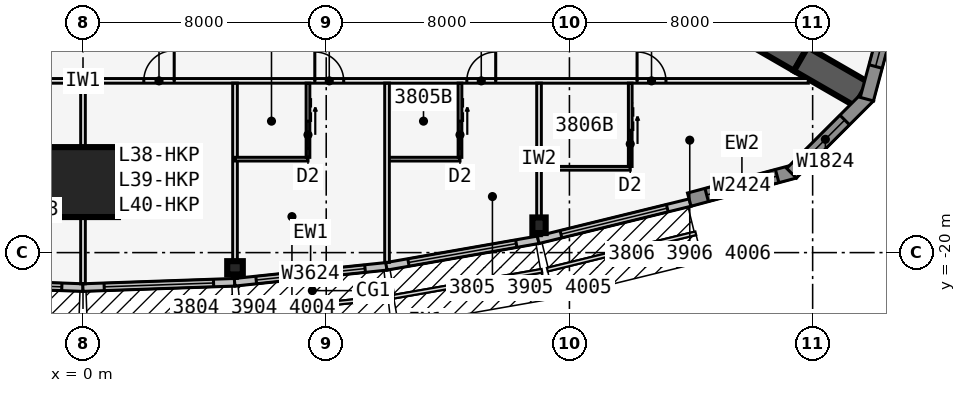
"""IFC4 building model, lengths in metres.
Left out: names, types, materials, properties, quantities, classifications, styles, units other than length and angle.
Written with IfcOpenShell. Run it as: python <this file> out.ifc"""

import sys

from ifc_helpers import new_model, si_unit, direction, frame, frame_2d, origin, origin_2d, place, context, subcontext, project, spatial, polyline, rectangle, i_section, outline, extrude, element, fill, save


model = new_model("IFC4")
c1 = context("Model", 3, precision=1e-05, world=origin(), true_north=direction((0.0, 1.0)))
c2 = subcontext(c1, "Body", "Model", "MODEL_VIEW")
j1 = project(units=[si_unit("LENGTHUNIT", "METRE"), si_unit("PLANEANGLEUNIT", "RADIAN")], contexts=[c1])
p1 = place(None, origin())
s1 = spatial("IfcSite", under=j1, at=p1, CompositionType="ELEMENT")
p2 = place(p1, origin())
s2 = spatial("IfcBuilding", under=s1, at=p2, CompositionType="ELEMENT")
p3 = place(p2, frame((0.0, 0.0, 145.3)))
s3 = spatial("IfcBuildingStorey", under=s2, at=p3, CompositionType="ELEMENT", Elevation=145.3)
for number, where, z_axis, x_axis in (
    (1, (21.61, -12.477, 0.0), (0.0, 0.0, 1.0), (0.866, -0.5, 0.0)),
    (2, (23.61, -13.631, 0.0), (0.0, 0.0, 1.0), (0.866, -0.5, 0.0)),
):
    element("IfcWall", number, at=place(p3, frame(where, z_axis=z_axis, x_axis=x_axis)), inside=s3, PredefinedType="SHEAR", context=c2, shape_type="SweptSolid", body=[
        extrude(rectangle(XDim=2.309, YDim=0.9, at=frame_2d((1.155, 0.0))), origin(), (0.0, 0.0, 1.0), 3.4),
    ])
for number, where, z_axis, x_axis in (
    (3, (5.0, -20.5, 0.0), (0.0, 0.0, 1.0), (0.0, -1.0, 0.0)),
    (4, (15.0, -19.1, 0.0), (0.0, 0.0, 1.0), (1.0, 0.0, 0.0)),
):
    element("IfcColumn", number, at=place(p3, frame(where, z_axis=z_axis, x_axis=x_axis)), inside=s3, PredefinedType="COLUMN", context=c2, shape_type="SweptSolid", body=[
        extrude(i_section(OverallWidth=0.437, OverallDepth=0.513, WebThickness=0.061, FlangeThickness=0.097, at=origin_2d()), origin(), (0.0, 0.0, 1.0), 3.4),
    ])
p4 = place(p3, frame((0.0, -17.68, 0.0), z_axis=(0.0, 0.0, 1.0), x_axis=(0.0, -1.0, 0.0)))
e5 = element("IfcColumn", 5, at=p4, inside=s3, PredefinedType="COLUMN", context=c2, shape_type="SweptSolid", body=[
    extrude(rectangle(XDim=2.3, YDim=2.3, at=origin_2d()), origin(), (0.0, 0.0, 1.0), 3.4),
])
p5 = place(p3, frame((-4.996, -20.975, 0.0), z_axis=(0.0, 0.0, 1.0), x_axis=(0.999387720943, -0.034988329879, 0.0)))
e6 = element("IfcWall", 6, at=p5, inside=s3, PredefinedType="STANDARD", context=c2, shape_type="SweptSolid", body=[
    extrude(rectangle(XDim=5.003, YDim=0.25, at=frame_2d((2.501, 0.0))), origin(), (0.0, 0.0, 1.0), 3.235),
])
p6 = place(p5, frame((0.701, 0.0, 0.45)))
e7 = element("IfcOpeningElement", 7, at=p6, cuts=e6, PredefinedType="OPENING", context=c2, shape_type="SweptSolid", body=[
    extrude(rectangle(XDim=3.6, YDim=2.4, at=frame_2d((1.8, 1.2))), frame((0.0, 0.135, 0.0), z_axis=(0.0, -1.0, 0.0), x_axis=(1.0, 0.0, 0.0)), (0.0, 0.0, 1.0), 0.27),
])
p7 = place(p3, frame((-0.004, -21.15, 0.0), z_axis=(0.0, 0.0, 1.0), x_axis=(0.999387720943, 0.034988329879, 0.0)))
e8 = element("IfcWall", 8, at=p7, inside=s3, PredefinedType="STANDARD", context=c2, shape_type="SweptSolid", body=[
    extrude(rectangle(XDim=5.003, YDim=0.25, at=frame_2d((2.501, 0.0))), origin(), (0.0, 0.0, 1.0), 3.235),
])
p8 = place(p7, frame((0.701, 0.0, 0.45)))
e9 = element("IfcOpeningElement", 9, at=p8, cuts=e8, PredefinedType="OPENING", context=c2, shape_type="SweptSolid", body=[
    extrude(rectangle(XDim=3.6, YDim=2.4, at=frame_2d((1.8, 1.2))), frame((0.0, 0.135, 0.0), z_axis=(0.0, -1.0, 0.0), x_axis=(1.0, 0.0, 0.0)), (0.0, 0.0, 1.0), 0.27),
])
p9 = place(p3, frame((4.987, -20.976, 0.0), z_axis=(0.0, 0.0, 1.0), x_axis=(0.994534683851, 0.104406717299, 0.0)))
e10 = element("IfcWall", 10, at=p9, inside=s3, PredefinedType="STANDARD", context=c2, shape_type="SweptSolid", body=[
    extrude(rectangle(XDim=5.028, YDim=0.25, at=frame_2d((2.514, 0.0))), origin(), (0.0, 0.0, 1.0), 3.235),
])
p10 = place(p9, frame((0.714, 0.0, 0.45)))
e11 = element("IfcOpeningElement", 11, at=p10, cuts=e10, PredefinedType="OPENING", context=c2, shape_type="SweptSolid", body=[
    extrude(rectangle(XDim=3.6, YDim=2.4, at=frame_2d((1.8, 1.2))), frame((0.0, 0.135, 0.0), z_axis=(0.0, -1.0, 0.0), x_axis=(1.0, 0.0, 0.0)), (0.0, 0.0, 1.0), 0.27),
])
p11 = place(p3, frame((9.979, -20.452, 0.0), z_axis=(0.0, 0.0, 1.0), x_axis=(0.985030467156, 0.172380331752, 0.0)))
e12 = element("IfcWall", 12, at=p11, inside=s3, PredefinedType="STANDARD", context=c2, shape_type="SweptSolid", body=[
    extrude(rectangle(XDim=5.076, YDim=0.25, at=frame_2d((2.538, 0.0))), origin(), (0.0, 0.0, 1.0), 3.235),
])
p12 = place(p11, frame((0.738, 0.0, 0.45)))
e13 = element("IfcOpeningElement", 13, at=p12, cuts=e12, PredefinedType="OPENING", context=c2, shape_type="SweptSolid", body=[
    extrude(rectangle(XDim=3.6, YDim=2.4, at=frame_2d((1.8, 1.2))), frame((0.0, 0.135, 0.0), z_axis=(0.0, -1.0, 0.0), x_axis=(1.0, 0.0, 0.0)), (0.0, 0.0, 1.0), 0.27),
])
p13 = place(p3, frame((14.97, -19.579, 0.0), z_axis=(0.0, 0.0, 1.0), x_axis=(0.971270024053, 0.237980126011, 0.0)))
e14 = element("IfcWall", 14, at=p13, inside=s3, PredefinedType="STANDARD", context=c2, shape_type="SweptSolid", body=[
    extrude(rectangle(XDim=5.148, YDim=0.25, at=frame_2d((2.574, 0.0))), origin(), (0.0, 0.0, 1.0), 3.235),
])
p14 = place(p13, frame((0.774, 0.0, 0.45)))
e15 = element("IfcOpeningElement", 15, at=p14, cuts=e14, PredefinedType="OPENING", context=c2, shape_type="SweptSolid", body=[
    extrude(rectangle(XDim=3.6, YDim=2.4, at=frame_2d((1.8, 1.2))), frame((0.0, 0.135, 0.0), z_axis=(0.0, -1.0, 0.0), x_axis=(1.0, 0.0, 0.0)), (0.0, 0.0, 1.0), 0.27),
])
p15 = place(p3, frame((19.942, -18.258, 0.0), z_axis=(0.0, 0.0, 1.0), x_axis=(0.965924653531, 0.258823421857, 0.0)))
e16 = element("IfcWall", 16, at=p15, inside=s3, PredefinedType="SOLIDWALL", context=c2, shape_type="SweptSolid", body=[
    extrude(rectangle(XDim=3.586, YDim=0.45, at=frame_2d((1.793, 0.0))), origin(), (0.0, 0.0, 1.0), 3.235),
])
p16 = place(p15, frame((0.593, 0.0, 0.45)))
e17 = element("IfcOpeningElement", 17, at=p16, cuts=e16, PredefinedType="OPENING", context=c2, shape_type="SweptSolid", body=[
    extrude(rectangle(XDim=2.4, YDim=2.4, at=frame_2d((1.2, 1.2))), frame((0.0, 0.235, 0.0), z_axis=(0.0, -1.0, 0.0), x_axis=(1.0, 0.0, 0.0)), (0.0, 0.0, 1.0), 0.47),
])
p17 = place(p3, frame((23.305, -17.388, 0.0), z_axis=(0.0, 0.0, 1.0), x_axis=(0.707106781187, 0.707106781187, 0.0)))
e18 = element("IfcWall", 18, at=p17, inside=s3, PredefinedType="SOLIDWALL", context=c2, shape_type="SweptSolid", body=[
    extrude(outline(polyline([(3.586, 0.225), (3.527, 0.225), (3.035, 0.093), (3.0, 0.225), (0.0, 0.225), (0.0, -0.225), (3.586, -0.225), (3.586, 0.225)])), origin(), (0.0, 0.0, 1.0), 3.235),
])
p18 = place(p17, frame((0.675, 0.0, 0.45)))
e19 = element("IfcOpeningElement", 19, at=p18, cuts=e18, PredefinedType="OPENING", context=c2, shape_type="SweptSolid", body=[
    extrude(rectangle(XDim=1.8, YDim=2.4, at=frame_2d((0.9, 1.2))), frame((0.0, 0.235, 0.0), z_axis=(0.0, -1.0, 0.0), x_axis=(1.0, 0.0, 0.0)), (0.0, 0.0, 1.0), 0.47),
])
p19 = place(p3, frame((25.783, -14.953, 0.0), z_axis=(0.0, 0.0, 1.0), x_axis=(0.258823421857, 0.965924653531, 0.0)))
e20 = element("IfcWall", 20, at=p19, inside=s3, PredefinedType="SOLIDWALL", context=c2, shape_type="SweptSolid", body=[
    extrude(outline(polyline([(3.586, 0.225), (0.586, 0.225), (0.551, 0.093), (0.06, 0.225), (0.0, 0.225), (0.0, -0.225), (3.586, -0.225), (3.586, 0.225)])), origin(), (0.0, 0.0, 1.0), 3.235),
])
p20 = place(p19, frame((1.111, 0.0, 0.45)))
e21 = element("IfcOpeningElement", 21, at=p20, cuts=e20, PredefinedType="OPENING", context=c2, shape_type="SweptSolid", body=[
    extrude(rectangle(XDim=1.8, YDim=2.4, at=frame_2d((0.9, 1.2))), frame((0.0, 0.235, 0.0), z_axis=(0.0, -1.0, 0.0), x_axis=(1.0, 0.0, 0.0)), (0.0, 0.0, 1.0), 0.47),
])
p21 = place(p3, frame((-23.857, -14.351, 0.0), z_axis=(0.0, 0.0, 1.0), x_axis=(1.0, 0.0, 0.0)))
e22 = element("IfcWall", 22, at=p21, inside=s3, PredefinedType="PARTITIONING", context=c2, shape_type="SweptSolid", body=[
    extrude(rectangle(XDim=47.714, YDim=0.15, at=frame_2d((23.857, 0.0))), origin(), (0.0, 0.0, 1.0), 3.235),
])
p22 = place(p21, frame((3.723, 0.0, 0.0)))
e23 = element("IfcOpeningElement", 23, at=p22, cuts=e22, PredefinedType="OPENING", context=c2, shape_type="SweptSolid", body=[
    extrude(rectangle(XDim=0.95, YDim=2.13, at=frame_2d((0.475, 1.065))), frame((0.0, 0.085, 0.0), z_axis=(0.0, -1.0, 0.0), x_axis=(1.0, 0.0, 0.0)), (0.0, 0.0, 1.0), 0.17),
])
p23 = place(p21, frame((17.082, 0.0, 0.0)))
e24 = element("IfcOpeningElement", 24, at=p23, cuts=e22, PredefinedType="OPENING", context=c2, shape_type="SweptSolid", body=[
    extrude(rectangle(XDim=0.95, YDim=2.13, at=frame_2d((0.475, 1.065))), frame((0.0, 0.085, 0.0), z_axis=(0.0, -1.0, 0.0), x_axis=(1.0, 0.0, 0.0)), (0.0, 0.0, 1.0), 0.17),
])
p24 = place(p21, frame((21.482, 0.0, 0.0)))
e25 = element("IfcOpeningElement", 25, at=p24, cuts=e22, PredefinedType="OPENING", context=c2, shape_type="SweptSolid", body=[
    extrude(rectangle(XDim=0.95, YDim=2.13, at=frame_2d((0.475, 1.065))), frame((0.0, 0.085, 0.0), z_axis=(0.0, -1.0, 0.0), x_axis=(1.0, 0.0, 0.0)), (0.0, 0.0, 1.0), 0.17),
])
p25 = place(p21, frame((25.857, 0.0, 0.0)))
e26 = element("IfcOpeningElement", 26, at=p25, cuts=e22, PredefinedType="OPENING", context=c2, shape_type="SweptSolid", body=[
    extrude(rectangle(XDim=1.0, YDim=2.13, at=frame_2d((0.5, 1.065))), frame((0.0, 0.085, 0.0), z_axis=(0.0, -1.0, 0.0), x_axis=(1.0, 0.0, 0.0)), (0.0, 0.0, 1.0), 0.17),
])
p26 = place(p21, frame((31.482, 0.0, 0.0)))
e27 = element("IfcOpeningElement", 27, at=p26, cuts=e22, PredefinedType="OPENING", context=c2, shape_type="SweptSolid", body=[
    extrude(rectangle(XDim=0.95, YDim=2.13, at=frame_2d((0.475, 1.065))), frame((0.0, 0.085, 0.0), z_axis=(0.0, -1.0, 0.0), x_axis=(1.0, 0.0, 0.0)), (0.0, 0.0, 1.0), 0.17),
])
p27 = place(p21, frame((36.482, 0.0, 0.0)))
e28 = element("IfcOpeningElement", 28, at=p27, cuts=e22, PredefinedType="OPENING", context=c2, shape_type="SweptSolid", body=[
    extrude(rectangle(XDim=0.95, YDim=2.13, at=frame_2d((0.475, 1.065))), frame((0.0, 0.085, 0.0), z_axis=(0.0, -1.0, 0.0), x_axis=(1.0, 0.0, 0.0)), (0.0, 0.0, 1.0), 0.17),
])
p28 = place(p21, frame((42.082, 0.0, 0.0)))
e29 = element("IfcOpeningElement", 29, at=p28, cuts=e22, PredefinedType="OPENING", context=c2, shape_type="SweptSolid", body=[
    extrude(rectangle(XDim=0.95, YDim=2.13, at=frame_2d((0.475, 1.065))), frame((0.0, 0.085, 0.0), z_axis=(0.0, -1.0, 0.0), x_axis=(1.0, 0.0, 0.0)), (0.0, 0.0, 1.0), 0.17),
])
p29 = place(p3, frame((0.0, -14.426, 0.0), z_axis=(0.0, 0.0, 1.0), x_axis=(0.0, -1.0, 0.0)))
e30 = element("IfcWall", 30, at=p29, inside=s3, PredefinedType="PARTITIONING", context=c2, shape_type="SweptSolid", body=[
    extrude(rectangle(XDim=6.599, YDim=0.15, at=frame_2d((3.299, 0.0))), origin(), (0.0, 0.0, 1.0), 2.389),
])
p30 = place(p3, frame((5.0, -14.426, 0.0), z_axis=(0.0, 0.0, 1.0), x_axis=(0.0, -1.0, 0.0)))
e31 = element("IfcWall", 31, at=p30, inside=s3, PredefinedType="PARTITIONING", context=c2, shape_type="SweptSolid", body=[
    extrude(rectangle(XDim=6.423, YDim=0.15, at=frame_2d((3.211, 0.0))), origin(), (0.0, 0.0, 1.0), 2.389),
])
p31 = place(p3, frame((10.0, -14.426, 0.0), z_axis=(0.0, 0.0, 1.0), x_axis=(0.0, -1.0, 0.0)))
e32 = element("IfcWall", 32, at=p31, inside=s3, PredefinedType="PARTITIONING", context=c2, shape_type="SweptSolid", body=[
    extrude(rectangle(XDim=5.895, YDim=0.15, at=frame_2d((2.948, 0.0))), origin(), (0.0, 0.0, 1.0), 2.389),
])
p32 = place(p3, frame((15.0, -14.426, 0.0), z_axis=(0.0, 0.0, 1.0), x_axis=(0.0, -1.0, 0.0)))
e33 = element("IfcWall", 33, at=p32, inside=s3, PredefinedType="PARTITIONING", context=c2, shape_type="SweptSolid", body=[
    extrude(rectangle(XDim=5.017, YDim=0.15, at=frame_2d((2.508, 0.0))), origin(), (0.0, 0.0, 1.0), 2.389),
])
p33 = place(p3, frame((5.0, -16.926, 0.0), z_axis=(0.0, 0.0, 1.0), x_axis=(1.0, 0.0, 0.0)))
e34 = element("IfcWall", 34, at=p33, inside=s3, PredefinedType="PLUMBINGWALL", context=c2, shape_type="SweptSolid", body=[
    extrude(rectangle(XDim=2.4, YDim=0.12, at=frame_2d((1.2, 0.0))), origin(), (0.0, 0.0, 1.0), 3.235),
])
p34 = place(p3, frame((7.4, -14.426, 0.0), z_axis=(0.0, 0.0, 1.0), x_axis=(0.0, -1.0, 0.0)))
e35 = element("IfcWall", 35, at=p34, inside=s3, PredefinedType="PLUMBINGWALL", context=c2, shape_type="SweptSolid", body=[
    extrude(rectangle(XDim=2.44, YDim=0.12, at=frame_2d((1.22, 0.0))), origin(), (0.0, 0.0, 1.0), 3.235),
])
p35 = place(p34, frame((1.25, 0.0, 0.0)))
e36 = element("IfcOpeningElement", 36, at=p35, cuts=e35, PredefinedType="OPENING", context=c2, shape_type="SweptSolid", body=[
    extrude(rectangle(XDim=0.9, YDim=2.13, at=frame_2d((0.45, 1.065))), frame((0.0, 0.07, 0.0), z_axis=(0.0, -1.0, 0.0), x_axis=(1.0, 0.0, 0.0)), (0.0, 0.0, 1.0), 0.14),
])
p36 = place(p3, frame((10.0, -16.926, 0.0), z_axis=(0.0, 0.0, 1.0), x_axis=(1.0, 0.0, 0.0)))
e37 = element("IfcWall", 37, at=p36, inside=s3, PredefinedType="PLUMBINGWALL", context=c2, shape_type="SweptSolid", body=[
    extrude(rectangle(XDim=2.4, YDim=0.12, at=frame_2d((1.2, 0.0))), origin(), (0.0, 0.0, 1.0), 3.235),
])
p37 = place(p3, frame((12.4, -14.426, 0.0), z_axis=(0.0, 0.0, 1.0), x_axis=(0.0, -1.0, 0.0)))
e38 = element("IfcWall", 38, at=p37, inside=s3, PredefinedType="PLUMBINGWALL", context=c2, shape_type="SweptSolid", body=[
    extrude(rectangle(XDim=2.44, YDim=0.12, at=frame_2d((1.22, 0.0))), origin(), (0.0, 0.0, 1.0), 3.235),
])
p38 = place(p37, frame((1.25, 0.0, 0.0)))
e39 = element("IfcOpeningElement", 39, at=p38, cuts=e38, PredefinedType="OPENING", context=c2, shape_type="SweptSolid", body=[
    extrude(rectangle(XDim=0.9, YDim=2.13, at=frame_2d((0.45, 1.065))), frame((0.0, 0.07, 0.0), z_axis=(0.0, -1.0, 0.0), x_axis=(1.0, 0.0, 0.0)), (0.0, 0.0, 1.0), 0.14),
])
p39 = place(p3, frame((15.0, -17.226, 0.0), z_axis=(0.0, 0.0, 1.0), x_axis=(1.0, 0.0, 0.0)))
e40 = element("IfcWall", 40, at=p39, inside=s3, PredefinedType="PLUMBINGWALL", context=c2, shape_type="SweptSolid", body=[
    extrude(rectangle(XDim=3.0, YDim=0.12, at=frame_2d((1.5, 0.0))), origin(), (0.0, 0.0, 1.0), 3.235),
])
p40 = place(p3, frame((18.0, -14.426, 0.0), z_axis=(0.0, 0.0, 1.0), x_axis=(0.0, -1.0, 0.0)))
e41 = element("IfcWall", 41, at=p40, inside=s3, PredefinedType="PLUMBINGWALL", context=c2, shape_type="SweptSolid", body=[
    extrude(rectangle(XDim=2.74, YDim=0.12, at=frame_2d((1.37, 0.0))), origin(), (0.0, 0.0, 1.0), 3.235),
])
p41 = place(p40, frame((1.55, 0.0, 0.0)))
e42 = element("IfcOpeningElement", 42, at=p41, cuts=e41, PredefinedType="OPENING", context=c2, shape_type="SweptSolid", body=[
    extrude(rectangle(XDim=0.9, YDim=2.13, at=frame_2d((0.45, 1.065))), frame((0.0, 0.07, 0.0), z_axis=(0.0, -1.0, 0.0), x_axis=(1.0, 0.0, 0.0)), (0.0, 0.0, 1.0), 0.14),
])
p42 = place(p6, origin())
e43 = element("IfcWindow", 43, at=p42, inside=s3, PartitioningType="SINGLE_PANEL", PredefinedType="WINDOW", context=c2, shape_type="SweptSolid", body=[
    extrude(rectangle(XDim=3.6, YDim=2.4, at=frame_2d((1.8, 1.2))), frame((0.0, 0.03, 0.0), z_axis=(0.0, -1.0, 0.0), x_axis=(1.0, 0.0, 0.0)), (0.0, 0.0, 1.0), 0.06),
])
fill(e7, e43)
p43 = place(p8, origin())
e44 = element("IfcWindow", 44, at=p43, inside=s3, PartitioningType="SINGLE_PANEL", PredefinedType="WINDOW", context=c2, shape_type="SweptSolid", body=[
    extrude(rectangle(XDim=3.6, YDim=2.4, at=frame_2d((1.8, 1.2))), frame((0.0, 0.03, 0.0), z_axis=(0.0, -1.0, 0.0), x_axis=(1.0, 0.0, 0.0)), (0.0, 0.0, 1.0), 0.06),
])
fill(e9, e44)
p44 = place(p10, origin())
e45 = element("IfcWindow", 45, at=p44, inside=s3, PartitioningType="SINGLE_PANEL", PredefinedType="WINDOW", context=c2, shape_type="SweptSolid", body=[
    extrude(rectangle(XDim=3.6, YDim=2.4, at=frame_2d((1.8, 1.2))), frame((0.0, 0.03, 0.0), z_axis=(0.0, -1.0, 0.0), x_axis=(1.0, 0.0, 0.0)), (0.0, 0.0, 1.0), 0.06),
])
fill(e11, e45)
p45 = place(p12, origin())
e46 = element("IfcWindow", 46, at=p45, inside=s3, PartitioningType="SINGLE_PANEL", PredefinedType="WINDOW", context=c2, shape_type="SweptSolid", body=[
    extrude(rectangle(XDim=3.6, YDim=2.4, at=frame_2d((1.8, 1.2))), frame((0.0, 0.03, 0.0), z_axis=(0.0, -1.0, 0.0), x_axis=(1.0, 0.0, 0.0)), (0.0, 0.0, 1.0), 0.06),
])
fill(e13, e46)
p46 = place(p14, origin())
e47 = element("IfcWindow", 47, at=p46, inside=s3, PartitioningType="SINGLE_PANEL", PredefinedType="WINDOW", context=c2, shape_type="SweptSolid", body=[
    extrude(rectangle(XDim=3.6, YDim=2.4, at=frame_2d((1.8, 1.2))), frame((0.0, 0.03, 0.0), z_axis=(0.0, -1.0, 0.0), x_axis=(1.0, 0.0, 0.0)), (0.0, 0.0, 1.0), 0.06),
])
fill(e15, e47)
p47 = place(p16, origin())
e48 = element("IfcWindow", 48, at=p47, inside=s3, PartitioningType="SINGLE_PANEL", PredefinedType="WINDOW", context=c2, shape_type="SweptSolid", body=[
    extrude(rectangle(XDim=2.4, YDim=2.4, at=frame_2d((1.2, 1.2))), frame((0.0, 0.03, 0.0), z_axis=(0.0, -1.0, 0.0), x_axis=(1.0, 0.0, 0.0)), (0.0, 0.0, 1.0), 0.06),
])
fill(e17, e48)
p48 = place(p18, origin())
e49 = element("IfcWindow", 49, at=p48, inside=s3, PartitioningType="SINGLE_PANEL", PredefinedType="WINDOW", context=c2, shape_type="SweptSolid", body=[
    extrude(rectangle(XDim=1.8, YDim=2.4, at=frame_2d((0.9, 1.2))), frame((0.0, 0.03, 0.0), z_axis=(0.0, -1.0, 0.0), x_axis=(1.0, 0.0, 0.0)), (0.0, 0.0, 1.0), 0.06),
])
fill(e19, e49)
p49 = place(p20, origin())
e50 = element("IfcWindow", 50, at=p49, inside=s3, PartitioningType="SINGLE_PANEL", PredefinedType="WINDOW", context=c2, shape_type="SweptSolid", body=[
    extrude(rectangle(XDim=1.8, YDim=2.4, at=frame_2d((0.9, 1.2))), frame((0.0, 0.03, 0.0), z_axis=(0.0, -1.0, 0.0), x_axis=(1.0, 0.0, 0.0)), (0.0, 0.0, 1.0), 0.06),
])
fill(e21, e50)
p50 = place(p25, origin())
e51 = element("IfcDoor", 51, at=p50, inside=s3, OperationType="SINGLE_SWING_RIGHT", PredefinedType="DOOR", context=c2, shape_type="SweptSolid", body=[
    extrude(rectangle(XDim=1.0, YDim=2.13, at=frame_2d((0.5, 1.065))), frame((0.0, 0.025, 0.0), z_axis=(0.0, -1.0, 0.0), x_axis=(1.0, 0.0, 0.0)), (0.0, 0.0, 1.0), 0.05),
])
fill(e26, e51)
p51 = place(p35, origin())
e52 = element("IfcDoor", 52, at=p51, inside=s3, OperationType="SLIDING_TO_LEFT", PredefinedType="DOOR", context=c2, shape_type="SweptSolid", body=[
    extrude(rectangle(XDim=0.9, YDim=2.13, at=frame_2d((0.45, 1.065))), frame((0.0, 0.025, 0.0), z_axis=(0.0, -1.0, 0.0), x_axis=(1.0, 0.0, 0.0)), (0.0, 0.0, 1.0), 0.05),
])
fill(e36, e52)
p52 = place(p26, origin())
e53 = element("IfcDoor", 53, at=p52, inside=s3, OperationType="SINGLE_SWING_LEFT", PredefinedType="DOOR", context=c2, shape_type="SweptSolid", body=[
    extrude(rectangle(XDim=0.95, YDim=2.13, at=frame_2d((0.475, 1.065))), frame((0.0, 0.025, 0.0), z_axis=(0.0, -1.0, 0.0), x_axis=(1.0, 0.0, 0.0)), (0.0, 0.0, 1.0), 0.05),
])
fill(e27, e53)
p53 = place(p38, origin())
e54 = element("IfcDoor", 54, at=p53, inside=s3, OperationType="SLIDING_TO_LEFT", PredefinedType="DOOR", context=c2, shape_type="SweptSolid", body=[
    extrude(rectangle(XDim=0.9, YDim=2.13, at=frame_2d((0.45, 1.065))), frame((0.0, 0.025, 0.0), z_axis=(0.0, -1.0, 0.0), x_axis=(1.0, 0.0, 0.0)), (0.0, 0.0, 1.0), 0.05),
])
fill(e39, e54)
p54 = place(p27, origin())
e55 = element("IfcDoor", 55, at=p54, inside=s3, OperationType="SINGLE_SWING_RIGHT", PredefinedType="DOOR", context=c2, shape_type="SweptSolid", body=[
    extrude(rectangle(XDim=0.95, YDim=2.13, at=frame_2d((0.475, 1.065))), frame((0.0, 0.025, 0.0), z_axis=(0.0, -1.0, 0.0), x_axis=(1.0, 0.0, 0.0)), (0.0, 0.0, 1.0), 0.05),
])
fill(e28, e55)
p55 = place(p41, origin())
e56 = element("IfcDoor", 56, at=p55, inside=s3, OperationType="SLIDING_TO_LEFT", PredefinedType="DOOR", context=c2, shape_type="SweptSolid", body=[
    extrude(rectangle(XDim=0.9, YDim=2.13, at=frame_2d((0.45, 1.065))), frame((0.0, 0.025, 0.0), z_axis=(0.0, -1.0, 0.0), x_axis=(1.0, 0.0, 0.0)), (0.0, 0.0, 1.0), 0.05),
])
fill(e42, e56)
p56 = place(p28, origin())
e57 = element("IfcDoor", 57, at=p56, inside=s3, OperationType="SINGLE_SWING_LEFT", PredefinedType="DOOR", context=c2, shape_type="SweptSolid", body=[
    extrude(rectangle(XDim=0.95, YDim=2.13, at=frame_2d((0.475, 1.065))), frame((0.0, 0.025, 0.0), z_axis=(0.0, -1.0, 0.0), x_axis=(1.0, 0.0, 0.0)), (0.0, 0.0, 1.0), 0.05),
])
fill(e29, e57)
save(model, sys.argv[1])
